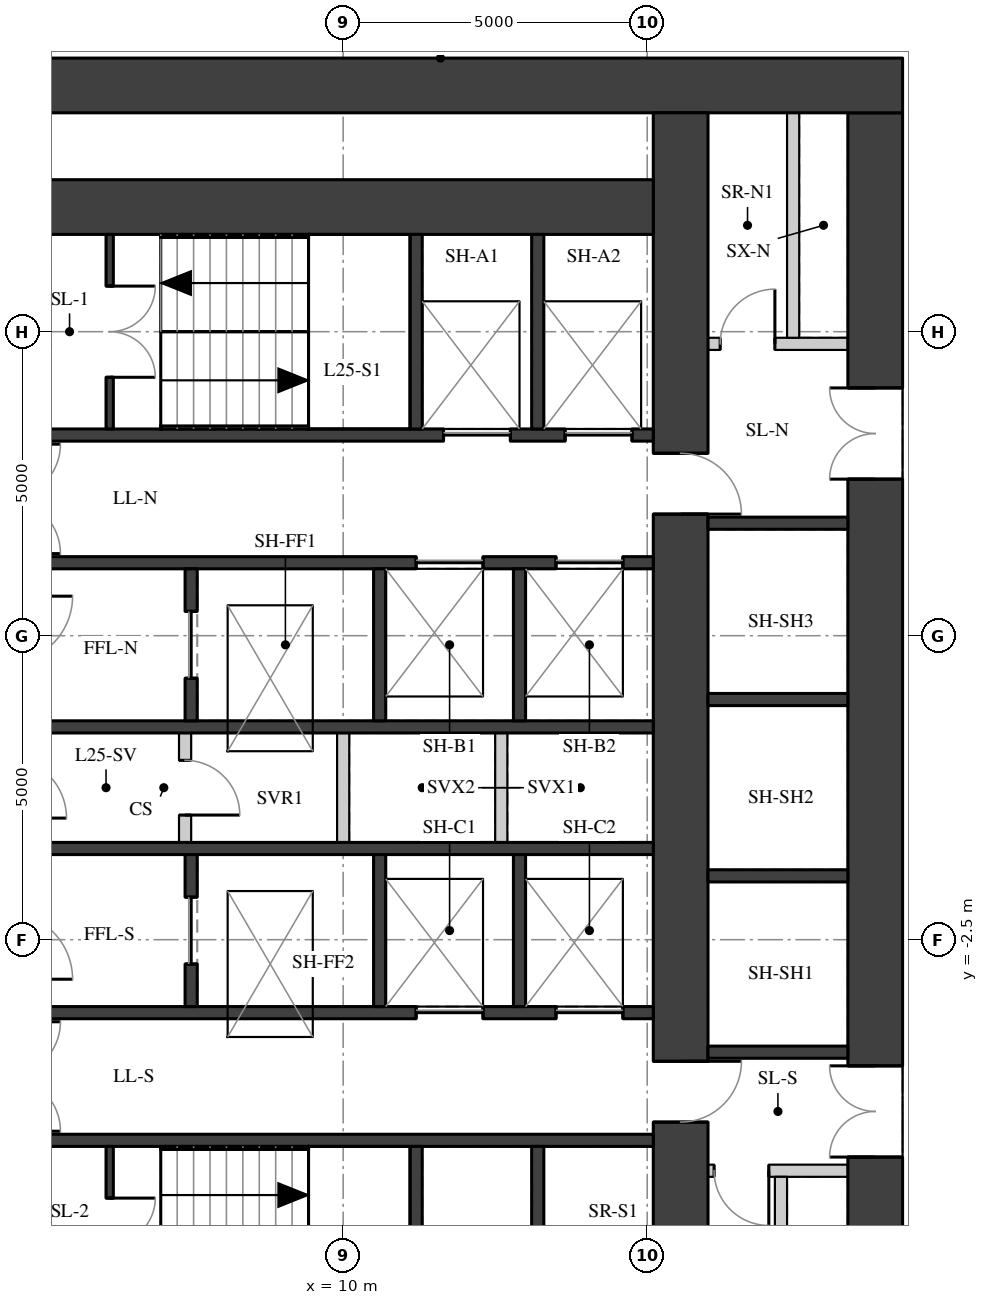
"""IFC4 building model, lengths in metres.
Left out: names, types, materials, properties, quantities, classifications, styles, units other than length and angle.
Written with IfcOpenShell. Run it as: python <this file> out.ifc"""

import sys

from ifc_helpers import new_model, si_unit, direction, frame, frame_2d, origin, place, context, subcontext, project, spatial, rectangle, extrude, element, fill, save


model = new_model("IFC4")
c1 = context("Model", 3, precision=1e-05, world=origin(), true_north=direction((0.0, 1.0)))
c2 = subcontext(c1, "Body", "Model", "MODEL_VIEW")
j1 = project(units=[si_unit("LENGTHUNIT", "METRE"), si_unit("PLANEANGLEUNIT", "RADIAN")], contexts=[c1])
p1 = place(None, origin())
s1 = spatial("IfcSite", under=j1, at=p1, CompositionType="ELEMENT")
p2 = place(p1, origin())
s2 = spatial("IfcBuilding", under=s1, at=p2, CompositionType="ELEMENT")
p3 = place(p2, frame((0.0, 0.0, 92.2)))
s3 = spatial("IfcBuildingStorey", under=s2, at=p3, CompositionType="ELEMENT", Elevation=92.2)
p4 = place(p3, frame((18.75, -11.1, 0.0), z_axis=(0.0, 0.0, 1.0), x_axis=(0.0, 1.0, 0.0)))
e1 = element("IfcWall", 1, at=p4, inside=s3, PredefinedType="SHEAR", context=c2, shape_type="SweptSolid", body=[
    extrude(rectangle(XDim=22.2, YDim=0.9, at=frame_2d((11.1, 0.0))), origin(), (0.0, 0.0, 1.0), 3.02),
])
p5 = place(p4, frame((16.175, 0.0, 0.0)))
e2 = element("IfcOpeningElement", 2, at=p5, cuts=e1, PredefinedType="OPENING", context=c2, shape_type="SweptSolid", body=[
    extrude(rectangle(XDim=1.5, YDim=2.1, at=frame_2d((0.75, 1.05))), frame((0.0, 0.46, 0.0), z_axis=(0.0, -1.0, 0.0), x_axis=(1.0, 0.0, 0.0)), (0.0, 0.0, 1.0), 0.92),
])
p6 = place(p4, frame((5.025, 0.0, 0.0)))
e3 = element("IfcOpeningElement", 3, at=p6, cuts=e1, PredefinedType="OPENING", context=c2, shape_type="SweptSolid", body=[
    extrude(rectangle(XDim=1.5, YDim=2.1, at=frame_2d((0.75, 1.05))), frame((0.0, 0.46, 0.0), z_axis=(0.0, -1.0, 0.0), x_axis=(1.0, 0.0, 0.0)), (0.0, 0.0, 1.0), 0.92),
])
p7 = place(p3, frame((4.0, 11.55, 0.0), z_axis=(0.0, 0.0, 1.0), x_axis=(1.0, 0.0, 0.0)))
e4 = element("IfcWall", 4, at=p7, inside=s3, PredefinedType="SHEAR", context=c2, shape_type="SweptSolid", body=[
    extrude(rectangle(XDim=15.2, YDim=0.9, at=frame_2d((7.6, 0.0))), origin(), (0.0, 0.0, 1.0), 3.02),
])
p8 = place(p3, frame((15.55, -11.1, 0.0), z_axis=(0.0, 0.0, 1.0), x_axis=(0.0, 1.0, 0.0)))
e5 = element("IfcWall", 5, at=p8, inside=s3, PredefinedType="SHEAR", context=c2, shape_type="SweptSolid", body=[
    extrude(rectangle(XDim=22.2, YDim=0.9, at=frame_2d((11.1, 0.0))), origin(), (0.0, 0.0, 1.0), 3.02),
])
p9 = place(p8, frame((15.6, 0.0, 0.0)))
e6 = element("IfcOpeningElement", 6, at=p9, cuts=e5, PredefinedType="OPENING", context=c2, shape_type="SweptSolid", body=[
    extrude(rectangle(XDim=1.0, YDim=2.1, at=frame_2d((0.5, 1.05))), frame((0.0, 0.46, 0.0), z_axis=(0.0, -1.0, 0.0), x_axis=(1.0, 0.0, 0.0)), (0.0, 0.0, 1.0), 0.92),
])
p10 = place(p8, frame((5.6, 0.0, 0.0)))
e7 = element("IfcOpeningElement", 7, at=p10, cuts=e5, PredefinedType="OPENING", context=c2, shape_type="SweptSolid", body=[
    extrude(rectangle(XDim=1.0, YDim=2.1, at=frame_2d((0.5, 1.05))), frame((0.0, 0.46, 0.0), z_axis=(0.0, -1.0, 0.0), x_axis=(1.0, 0.0, 0.0)), (0.0, 0.0, 1.0), 0.92),
])
p11 = place(p3, frame((4.9, 9.55, 0.0), z_axis=(0.0, 0.0, 1.0), x_axis=(1.0, 0.0, 0.0)))
e8 = element("IfcWall", 8, at=p11, inside=s3, PredefinedType="SHEAR", context=c2, shape_type="SweptSolid", body=[
    extrude(rectangle(XDim=10.2, YDim=0.9, at=frame_2d((5.1, 0.0))), origin(), (0.0, 0.0, 1.0), 3.02),
])
p12 = place(p3, frame((4.9, 5.8, 0.0), z_axis=(0.0, 0.0, 1.0), x_axis=(1.0, 0.0, 0.0)))
e9 = element("IfcWall", 9, at=p12, inside=s3, PredefinedType="SHEAR", context=c2, shape_type="SweptSolid", body=[
    extrude(rectangle(XDim=10.2, YDim=0.2, at=frame_2d((5.1, 0.0))), origin(), (0.0, 0.0, 1.0), 3.02),
])
p13 = place(p12, frame((6.75, 0.0, 0.0)))
e10 = element("IfcOpeningElement", 10, at=p13, cuts=e9, PredefinedType="OPENING", context=c2, shape_type="SweptSolid", body=[
    extrude(rectangle(XDim=1.1, YDim=2.1, at=frame_2d((0.55, 1.05))), frame((0.0, 0.11, 0.0), z_axis=(0.0, -1.0, 0.0), x_axis=(1.0, 0.0, 0.0)), (0.0, 0.0, 1.0), 0.22),
])
p14 = place(p12, frame((8.75, 0.0, 0.0)))
e11 = element("IfcOpeningElement", 11, at=p14, cuts=e9, PredefinedType="OPENING", context=c2, shape_type="SweptSolid", body=[
    extrude(rectangle(XDim=1.1, YDim=2.1, at=frame_2d((0.55, 1.05))), frame((0.0, 0.11, 0.0), z_axis=(0.0, -1.0, 0.0), x_axis=(1.0, 0.0, 0.0)), (0.0, 0.0, 1.0), 0.22),
])
p15 = place(p3, frame((4.9, 3.7, 0.0), z_axis=(0.0, 0.0, 1.0), x_axis=(1.0, 0.0, 0.0)))
e12 = element("IfcWall", 12, at=p15, inside=s3, PredefinedType="SHEAR", context=c2, shape_type="SweptSolid", body=[
    extrude(rectangle(XDim=10.2, YDim=0.2, at=frame_2d((5.1, 0.0))), origin(), (0.0, 0.0, 1.0), 3.02),
])
p16 = place(p15, frame((6.3, 0.0, 0.0)))
e13 = element("IfcOpeningElement", 13, at=p16, cuts=e12, PredefinedType="OPENING", context=c2, shape_type="SweptSolid", body=[
    extrude(rectangle(XDim=1.1, YDim=2.1, at=frame_2d((0.55, 1.05))), frame((0.0, 0.11, 0.0), z_axis=(0.0, -1.0, 0.0), x_axis=(1.0, 0.0, 0.0)), (0.0, 0.0, 1.0), 0.22),
])
p17 = place(p15, frame((8.6, 0.0, 0.0)))
e14 = element("IfcOpeningElement", 14, at=p17, cuts=e12, PredefinedType="OPENING", context=c2, shape_type="SweptSolid", body=[
    extrude(rectangle(XDim=1.1, YDim=2.1, at=frame_2d((0.55, 1.05))), frame((0.0, 0.11, 0.0), z_axis=(0.0, -1.0, 0.0), x_axis=(1.0, 0.0, 0.0)), (0.0, 0.0, 1.0), 0.22),
])
for number, where, z_axis, x_axis in (
    (15, (4.9, 1.0, 0.0), (0.0, 0.0, 1.0), (1.0, 0.0, 0.0)),
    (16, (4.9, -1.0, 0.0), (0.0, 0.0, 1.0), (1.0, 0.0, 0.0)),
):
    element("IfcWall", number, at=place(p3, frame(where, z_axis=z_axis, x_axis=x_axis)), inside=s3, PredefinedType="SHEAR", context=c2, shape_type="SweptSolid", body=[
        extrude(rectangle(XDim=10.2, YDim=0.2, at=frame_2d((5.1, 0.0))), origin(), (0.0, 0.0, 1.0), 3.02),
    ])
p18 = place(p3, frame((4.9, -3.7, 0.0), z_axis=(0.0, 0.0, 1.0), x_axis=(1.0, 0.0, 0.0)))
e17 = element("IfcWall", 17, at=p18, inside=s3, PredefinedType="SHEAR", context=c2, shape_type="SweptSolid", body=[
    extrude(rectangle(XDim=10.2, YDim=0.2, at=frame_2d((5.1, 0.0))), origin(), (0.0, 0.0, 1.0), 3.02),
])
p19 = place(p18, frame((6.3, 0.0, 0.0)))
e18 = element("IfcOpeningElement", 18, at=p19, cuts=e17, PredefinedType="OPENING", context=c2, shape_type="SweptSolid", body=[
    extrude(rectangle(XDim=1.1, YDim=2.1, at=frame_2d((0.55, 1.05))), frame((0.0, 0.11, 0.0), z_axis=(0.0, -1.0, 0.0), x_axis=(1.0, 0.0, 0.0)), (0.0, 0.0, 1.0), 0.22),
])
p20 = place(p18, frame((8.6, 0.0, 0.0)))
e19 = element("IfcOpeningElement", 19, at=p20, cuts=e17, PredefinedType="OPENING", context=c2, shape_type="SweptSolid", body=[
    extrude(rectangle(XDim=1.1, YDim=2.1, at=frame_2d((0.55, 1.05))), frame((0.0, 0.11, 0.0), z_axis=(0.0, -1.0, 0.0), x_axis=(1.0, 0.0, 0.0)), (0.0, 0.0, 1.0), 0.22),
])
p21 = place(p3, frame((4.9, -5.8, 0.0), z_axis=(0.0, 0.0, 1.0), x_axis=(1.0, 0.0, 0.0)))
e20 = element("IfcWall", 20, at=p21, inside=s3, PredefinedType="SHEAR", context=c2, shape_type="SweptSolid", body=[
    extrude(rectangle(XDim=10.2, YDim=0.2, at=frame_2d((5.1, 0.0))), origin(), (0.0, 0.0, 1.0), 3.02),
])
for number, where, z_axis, x_axis in (
    (21, (11.2, 5.9, 0.0), (0.0, 0.0, 1.0), (0.0, 1.0, 0.0)),
    (22, (11.2, -9.1, 0.0), (0.0, 0.0, 1.0), (0.0, 1.0, 0.0)),
    (23, (13.2, 5.9, 0.0), (0.0, 0.0, 1.0), (0.0, 1.0, 0.0)),
    (24, (13.2, -9.1, 0.0), (0.0, 0.0, 1.0), (0.0, 1.0, 0.0)),
):
    element("IfcWall", number, at=place(p3, frame(where, z_axis=z_axis, x_axis=x_axis)), inside=s3, PredefinedType="SHEAR", context=c2, shape_type="SweptSolid", body=[
        extrude(rectangle(XDim=3.2, YDim=0.2, at=frame_2d((1.6, 0.0))), origin(), (0.0, 0.0, 1.0), 3.02),
    ])
p22 = place(p3, frame((7.5, 1.1, 0.0), z_axis=(0.0, 0.0, 1.0), x_axis=(0.0, 1.0, 0.0)))
e25 = element("IfcWall", 25, at=p22, inside=s3, PredefinedType="SHEAR", context=c2, shape_type="SweptSolid", body=[
    extrude(rectangle(XDim=2.5, YDim=0.2, at=frame_2d((1.25, 0.0))), origin(), (0.0, 0.0, 1.0), 3.02),
])
p23 = place(p22, frame((0.7, 0.0, 0.0)))
e26 = element("IfcOpeningElement", 26, at=p23, cuts=e25, PredefinedType="OPENING", context=c2, shape_type="SweptSolid", body=[
    extrude(rectangle(XDim=1.1, YDim=2.1, at=frame_2d((0.55, 1.05))), frame((0.0, 0.11, 0.0), z_axis=(0.0, -1.0, 0.0), x_axis=(1.0, 0.0, 0.0)), (0.0, 0.0, 1.0), 0.22),
])
p24 = place(p3, frame((7.5, -3.6, 0.0), z_axis=(0.0, 0.0, 1.0), x_axis=(0.0, 1.0, 0.0)))
e27 = element("IfcWall", 27, at=p24, inside=s3, PredefinedType="SHEAR", context=c2, shape_type="SweptSolid", body=[
    extrude(rectangle(XDim=2.5, YDim=0.2, at=frame_2d((1.25, 0.0))), origin(), (0.0, 0.0, 1.0), 3.02),
])
p25 = place(p24, frame((0.7, 0.0, 0.0)))
e28 = element("IfcOpeningElement", 28, at=p25, cuts=e27, PredefinedType="OPENING", context=c2, shape_type="SweptSolid", body=[
    extrude(rectangle(XDim=1.1, YDim=2.1, at=frame_2d((0.55, 1.05))), frame((0.0, 0.11, 0.0), z_axis=(0.0, -1.0, 0.0), x_axis=(1.0, 0.0, 0.0)), (0.0, 0.0, 1.0), 0.22),
])
for number, where, z_axis, x_axis in (
    (29, (10.6, 1.1, 0.0), (0.0, 0.0, 1.0), (0.0, 1.0, 0.0)),
    (30, (10.6, -3.6, 0.0), (0.0, 0.0, 1.0), (0.0, 1.0, 0.0)),
    (31, (12.9, 1.1, 0.0), (0.0, 0.0, 1.0), (0.0, 1.0, 0.0)),
    (32, (12.9, -3.6, 0.0), (0.0, 0.0, 1.0), (0.0, 1.0, 0.0)),
):
    element("IfcWall", number, at=place(p3, frame(where, z_axis=z_axis, x_axis=x_axis)), inside=s3, PredefinedType="SHEAR", context=c2, shape_type="SweptSolid", body=[
        extrude(rectangle(XDim=2.5, YDim=0.2, at=frame_2d((1.25, 0.0))), origin(), (0.0, 0.0, 1.0), 3.02),
    ])
p26 = place(p3, frame((6.16, 5.9, 0.0), z_axis=(0.0, 0.0, 1.0), x_axis=(0.0, 1.0, 0.0)))
e33 = element("IfcWall", 33, at=p26, inside=s3, PredefinedType="SHEAR", context=c2, shape_type="SweptSolid", body=[
    extrude(rectangle(XDim=3.2, YDim=0.12, at=frame_2d((1.6, 0.0))), origin(), (0.0, 0.0, 1.0), 3.02),
])
p27 = place(p26, frame((0.85, 0.0, 0.0)))
e34 = element("IfcOpeningElement", 34, at=p27, cuts=e33, PredefinedType="OPENING", context=c2, shape_type="SweptSolid", body=[
    extrude(rectangle(XDim=1.5, YDim=2.1, at=frame_2d((0.75, 1.05))), frame((0.0, 0.07, 0.0), z_axis=(0.0, -1.0, 0.0), x_axis=(1.0, 0.0, 0.0)), (0.0, 0.0, 1.0), 0.14),
])
p28 = place(p3, frame((6.16, -9.1, 0.0), z_axis=(0.0, 0.0, 1.0), x_axis=(0.0, 1.0, 0.0)))
e35 = element("IfcWall", 35, at=p28, inside=s3, PredefinedType="SHEAR", context=c2, shape_type="SweptSolid", body=[
    extrude(rectangle(XDim=3.2, YDim=0.12, at=frame_2d((1.6, 0.0))), origin(), (0.0, 0.0, 1.0), 3.02),
])
p29 = place(p28, frame((0.85, 0.0, 0.0)))
e36 = element("IfcOpeningElement", 36, at=p29, cuts=e35, PredefinedType="OPENING", context=c2, shape_type="SweptSolid", body=[
    extrude(rectangle(XDim=1.5, YDim=2.1, at=frame_2d((0.75, 1.05))), frame((0.0, 0.07, 0.0), z_axis=(0.0, -1.0, 0.0), x_axis=(1.0, 0.0, 0.0)), (0.0, 0.0, 1.0), 0.14),
])
p30 = place(p3, frame((7.4, -0.9, 0.0), z_axis=(0.0, 0.0, 1.0), x_axis=(0.0, 1.0, 0.0)))
e37 = element("IfcWall", 37, at=p30, inside=s3, PredefinedType="PARTITIONING", context=c2, shape_type="SweptSolid", body=[
    extrude(rectangle(XDim=1.8, YDim=0.2, at=frame_2d((0.9, 0.0))), origin(), (0.0, 0.0, 1.0), 3.02),
])
p31 = place(p30, frame((0.45, 0.0, 0.0)))
e38 = element("IfcOpeningElement", 38, at=p31, cuts=e37, PredefinedType="OPENING", context=c2, shape_type="SweptSolid", body=[
    extrude(rectangle(XDim=0.9, YDim=2.1, at=frame_2d((0.45, 1.05))), frame((0.0, 0.11, 0.0), z_axis=(0.0, -1.0, 0.0), x_axis=(1.0, 0.0, 0.0)), (0.0, 0.0, 1.0), 0.22),
])
for number, where, z_axis, x_axis in (
    (39, (10.0, -0.9, 0.0), (0.0, 0.0, 1.0), (0.0, 1.0, 0.0)),
    (40, (12.6, -0.9, 0.0), (0.0, 0.0, 1.0), (0.0, 1.0, 0.0)),
):
    element("IfcWall", number, at=place(p3, frame(where, z_axis=z_axis, x_axis=x_axis)), inside=s3, PredefinedType="PARTITIONING", context=c2, shape_type="SweptSolid", body=[
        extrude(rectangle(XDim=1.8, YDim=0.2, at=frame_2d((0.9, 0.0))), origin(), (0.0, 0.0, 1.0), 3.02),
    ])
for number, where, z_axis, x_axis in (
    (41, (16.0, -4.35, 0.0), (0.0, 0.0, 1.0), (1.0, 0.0, 0.0)),
    (42, (16.0, -1.45, 0.0), (0.0, 0.0, 1.0), (1.0, 0.0, 0.0)),
    (43, (16.0, 1.45, 0.0), (0.0, 0.0, 1.0), (1.0, 0.0, 0.0)),
    (44, (16.0, 4.35, 0.0), (0.0, 0.0, 1.0), (1.0, 0.0, 0.0)),
):
    element("IfcWall", number, at=place(p3, frame(where, z_axis=z_axis, x_axis=x_axis)), inside=s3, PredefinedType="SHEAR", context=c2, shape_type="SweptSolid", body=[
        extrude(rectangle(XDim=2.3, YDim=0.2, at=frame_2d((1.15, 0.0))), origin(), (0.0, 0.0, 1.0), 3.02),
    ])
p32 = place(p3, frame((16.0, 7.3, 0.0), z_axis=(0.0, 0.0, 1.0), x_axis=(1.0, 0.0, 0.0)))
e45 = element("IfcWall", 45, at=p32, inside=s3, PredefinedType="PARTITIONING", context=c2, shape_type="SweptSolid", body=[
    extrude(rectangle(XDim=2.3, YDim=0.2, at=frame_2d((1.15, 0.0))), origin(), (0.0, 0.0, 1.0), 3.02),
])
p33 = place(p32, frame((0.2, 0.0, 0.0)))
e46 = element("IfcOpeningElement", 46, at=p33, cuts=e45, PredefinedType="OPENING", context=c2, shape_type="SweptSolid", body=[
    extrude(rectangle(XDim=0.9, YDim=2.1, at=frame_2d((0.45, 1.05))), frame((0.0, 0.11, 0.0), z_axis=(0.0, -1.0, 0.0), x_axis=(1.0, 0.0, 0.0)), (0.0, 0.0, 1.0), 0.22),
])
p34 = place(p3, frame((17.4, 7.4, 0.0), z_axis=(0.0, 0.0, 1.0), x_axis=(0.0, 1.0, 0.0)))
e47 = element("IfcWall", 47, at=p34, inside=s3, PredefinedType="PARTITIONING", context=c2, shape_type="SweptSolid", body=[
    extrude(rectangle(XDim=3.7, YDim=0.2, at=frame_2d((1.85, 0.0))), origin(), (0.0, 0.0, 1.0), 3.02),
])
p35 = place(p3, frame((16.0, -6.3, 0.0), z_axis=(0.0, 0.0, 1.0), x_axis=(1.0, 0.0, 0.0)))
e48 = element("IfcWall", 48, at=p35, inside=s3, PredefinedType="PARTITIONING", context=c2, shape_type="SweptSolid", body=[
    extrude(rectangle(XDim=2.3, YDim=0.2, at=frame_2d((1.15, 0.0))), origin(), (0.0, 0.0, 1.0), 3.02),
])
p36 = place(p35, frame((0.1, 0.0, 0.0)))
e49 = element("IfcOpeningElement", 49, at=p36, cuts=e48, PredefinedType="OPENING", context=c2, shape_type="SweptSolid", body=[
    extrude(rectangle(XDim=0.9, YDim=2.1, at=frame_2d((0.45, 1.05))), frame((0.0, 0.11, 0.0), z_axis=(0.0, -1.0, 0.0), x_axis=(1.0, 0.0, 0.0)), (0.0, 0.0, 1.0), 0.22),
])
p37 = place(p3, frame((17.2, -11.1, 0.0), z_axis=(0.0, 0.0, 1.0), x_axis=(0.0, 1.0, 0.0)))
e50 = element("IfcWall", 50, at=p37, inside=s3, PredefinedType="PARTITIONING", context=c2, shape_type="SweptSolid", body=[
    extrude(rectangle(XDim=4.7, YDim=0.2, at=frame_2d((2.35, 0.0))), origin(), (0.0, 0.0, 1.0), 3.02),
])
p38 = place(p5, origin())
e51 = element("IfcDoor", 51, at=p38, inside=s3, OperationType="DOUBLE_DOOR_SINGLE_SWING", PredefinedType="DOOR", context=c2, shape_type="SweptSolid", body=[
    extrude(rectangle(XDim=1.5, YDim=2.1, at=frame_2d((0.75, 1.05))), frame((0.0, 0.025, 0.0), z_axis=(0.0, -1.0, 0.0), x_axis=(1.0, 0.0, 0.0)), (0.0, 0.0, 1.0), 0.05),
])
fill(e2, e51)
p39 = place(p6, origin())
e52 = element("IfcDoor", 52, at=p39, inside=s3, OperationType="DOUBLE_DOOR_SINGLE_SWING", PredefinedType="DOOR", context=c2, shape_type="SweptSolid", body=[
    extrude(rectangle(XDim=1.5, YDim=2.1, at=frame_2d((0.75, 1.05))), frame((0.0, 0.025, 0.0), z_axis=(0.0, -1.0, 0.0), x_axis=(1.0, 0.0, 0.0)), (0.0, 0.0, 1.0), 0.05),
])
fill(e3, e52)
p40 = place(p27, origin())
e53 = element("IfcDoor", 53, at=p40, inside=s3, OperationType="DOUBLE_DOOR_SINGLE_SWING", PredefinedType="DOOR", context=c2, shape_type="SweptSolid", body=[
    extrude(rectangle(XDim=1.5, YDim=2.1, at=frame_2d((0.75, 1.05))), frame((0.0, 0.025, 0.0), z_axis=(0.0, -1.0, 0.0), x_axis=(1.0, 0.0, 0.0)), (0.0, 0.0, 1.0), 0.05),
])
fill(e34, e53)
p41 = place(p29, origin())
e54 = element("IfcDoor", 54, at=p41, inside=s3, OperationType="DOUBLE_DOOR_SINGLE_SWING", PredefinedType="DOOR", context=c2, shape_type="SweptSolid", body=[
    extrude(rectangle(XDim=1.5, YDim=2.1, at=frame_2d((0.75, 1.05))), frame((0.0, 0.025, 0.0), z_axis=(0.0, -1.0, 0.0), x_axis=(1.0, 0.0, 0.0)), (0.0, 0.0, 1.0), 0.05),
])
fill(e36, e54)
p42 = place(p13, origin())
e55 = element("IfcDoor", 55, at=p42, inside=s3, OperationType="DOUBLE_DOOR_SLIDING", PredefinedType="DOOR", context=c2, shape_type="SweptSolid", body=[
    extrude(rectangle(XDim=1.1, YDim=2.1, at=frame_2d((0.55, 1.05))), frame((0.0, 0.025, 0.0), z_axis=(0.0, -1.0, 0.0), x_axis=(1.0, 0.0, 0.0)), (0.0, 0.0, 1.0), 0.05),
])
fill(e10, e55)
p43 = place(p14, origin())
e56 = element("IfcDoor", 56, at=p43, inside=s3, OperationType="DOUBLE_DOOR_SLIDING", PredefinedType="DOOR", context=c2, shape_type="SweptSolid", body=[
    extrude(rectangle(XDim=1.1, YDim=2.1, at=frame_2d((0.55, 1.05))), frame((0.0, 0.025, 0.0), z_axis=(0.0, -1.0, 0.0), x_axis=(1.0, 0.0, 0.0)), (0.0, 0.0, 1.0), 0.05),
])
fill(e11, e56)
p44 = place(p16, origin())
e57 = element("IfcDoor", 57, at=p44, inside=s3, OperationType="DOUBLE_DOOR_SLIDING", PredefinedType="DOOR", context=c2, shape_type="SweptSolid", body=[
    extrude(rectangle(XDim=1.1, YDim=2.1, at=frame_2d((0.55, 1.05))), frame((0.0, 0.025, 0.0), z_axis=(0.0, -1.0, 0.0), x_axis=(1.0, 0.0, 0.0)), (0.0, 0.0, 1.0), 0.05),
])
fill(e13, e57)
p45 = place(p17, origin())
e58 = element("IfcDoor", 58, at=p45, inside=s3, OperationType="DOUBLE_DOOR_SLIDING", PredefinedType="DOOR", context=c2, shape_type="SweptSolid", body=[
    extrude(rectangle(XDim=1.1, YDim=2.1, at=frame_2d((0.55, 1.05))), frame((0.0, 0.025, 0.0), z_axis=(0.0, -1.0, 0.0), x_axis=(1.0, 0.0, 0.0)), (0.0, 0.0, 1.0), 0.05),
])
fill(e14, e58)
p46 = place(p19, origin())
e59 = element("IfcDoor", 59, at=p46, inside=s3, OperationType="DOUBLE_DOOR_SLIDING", PredefinedType="DOOR", context=c2, shape_type="SweptSolid", body=[
    extrude(rectangle(XDim=1.1, YDim=2.1, at=frame_2d((0.55, 1.05))), frame((0.0, 0.025, 0.0), z_axis=(0.0, -1.0, 0.0), x_axis=(1.0, 0.0, 0.0)), (0.0, 0.0, 1.0), 0.05),
])
fill(e18, e59)
p47 = place(p20, origin())
e60 = element("IfcDoor", 60, at=p47, inside=s3, OperationType="DOUBLE_DOOR_SLIDING", PredefinedType="DOOR", context=c2, shape_type="SweptSolid", body=[
    extrude(rectangle(XDim=1.1, YDim=2.1, at=frame_2d((0.55, 1.05))), frame((0.0, 0.025, 0.0), z_axis=(0.0, -1.0, 0.0), x_axis=(1.0, 0.0, 0.0)), (0.0, 0.0, 1.0), 0.05),
])
fill(e19, e60)
p48 = place(p23, origin())
e61 = element("IfcDoor", 61, at=p48, inside=s3, OperationType="DOUBLE_DOOR_SLIDING", PredefinedType="DOOR", context=c2, shape_type="SweptSolid", body=[
    extrude(rectangle(XDim=1.1, YDim=2.1, at=frame_2d((0.55, 1.05))), frame((0.0, 0.025, 0.0), z_axis=(0.0, -1.0, 0.0), x_axis=(1.0, 0.0, 0.0)), (0.0, 0.0, 1.0), 0.05),
])
fill(e26, e61)
p49 = place(p25, origin())
e62 = element("IfcDoor", 62, at=p49, inside=s3, OperationType="DOUBLE_DOOR_SLIDING", PredefinedType="DOOR", context=c2, shape_type="SweptSolid", body=[
    extrude(rectangle(XDim=1.1, YDim=2.1, at=frame_2d((0.55, 1.05))), frame((0.0, 0.025, 0.0), z_axis=(0.0, -1.0, 0.0), x_axis=(1.0, 0.0, 0.0)), (0.0, 0.0, 1.0), 0.05),
])
fill(e28, e62)
p50 = place(p31, origin())
e63 = element("IfcDoor", 63, at=p50, inside=s3, OperationType="SINGLE_SWING_RIGHT", PredefinedType="DOOR", context=c2, shape_type="SweptSolid", body=[
    extrude(rectangle(XDim=0.9, YDim=2.1, at=frame_2d((0.45, 1.05))), frame((0.0, 0.025, 0.0), z_axis=(0.0, -1.0, 0.0), x_axis=(1.0, 0.0, 0.0)), (0.0, 0.0, 1.0), 0.05),
])
fill(e38, e63)
p51 = place(p9, origin())
e64 = element("IfcDoor", 64, at=p51, inside=s3, OperationType="SINGLE_SWING_RIGHT", PredefinedType="DOOR", context=c2, shape_type="SweptSolid", body=[
    extrude(rectangle(XDim=1.0, YDim=2.1, at=frame_2d((0.5, 1.05))), frame((0.0, 0.025, 0.0), z_axis=(0.0, -1.0, 0.0), x_axis=(1.0, 0.0, 0.0)), (0.0, 0.0, 1.0), 0.05),
])
fill(e6, e64)
p52 = place(p33, origin())
e65 = element("IfcDoor", 65, at=p52, inside=s3, OperationType="SINGLE_SWING_RIGHT", PredefinedType="DOOR", context=c2, shape_type="SweptSolid", body=[
    extrude(rectangle(XDim=0.9, YDim=2.1, at=frame_2d((0.45, 1.05))), frame((0.0, 0.025, 0.0), z_axis=(0.0, -1.0, 0.0), x_axis=(1.0, 0.0, 0.0)), (0.0, 0.0, 1.0), 0.05),
])
fill(e46, e65)
p53 = place(p10, origin())
e66 = element("IfcDoor", 66, at=p53, inside=s3, OperationType="SINGLE_SWING_LEFT", PredefinedType="DOOR", context=c2, shape_type="SweptSolid", body=[
    extrude(rectangle(XDim=1.0, YDim=2.1, at=frame_2d((0.5, 1.05))), frame((0.0, 0.025, 0.0), z_axis=(0.0, -1.0, 0.0), x_axis=(1.0, 0.0, 0.0)), (0.0, 0.0, 1.0), 0.05),
])
fill(e7, e66)
p54 = place(p36, origin())
e67 = element("IfcDoor", 67, at=p54, inside=s3, OperationType="SINGLE_SWING_LEFT", PredefinedType="DOOR", context=c2, shape_type="SweptSolid", body=[
    extrude(rectangle(XDim=0.9, YDim=2.1, at=frame_2d((0.45, 1.05))), frame((0.0, 0.025, 0.0), z_axis=(0.0, -1.0, 0.0), x_axis=(1.0, 0.0, 0.0)), (0.0, 0.0, 1.0), 0.05),
])
fill(e49, e67)
save(model, sys.argv[1])
